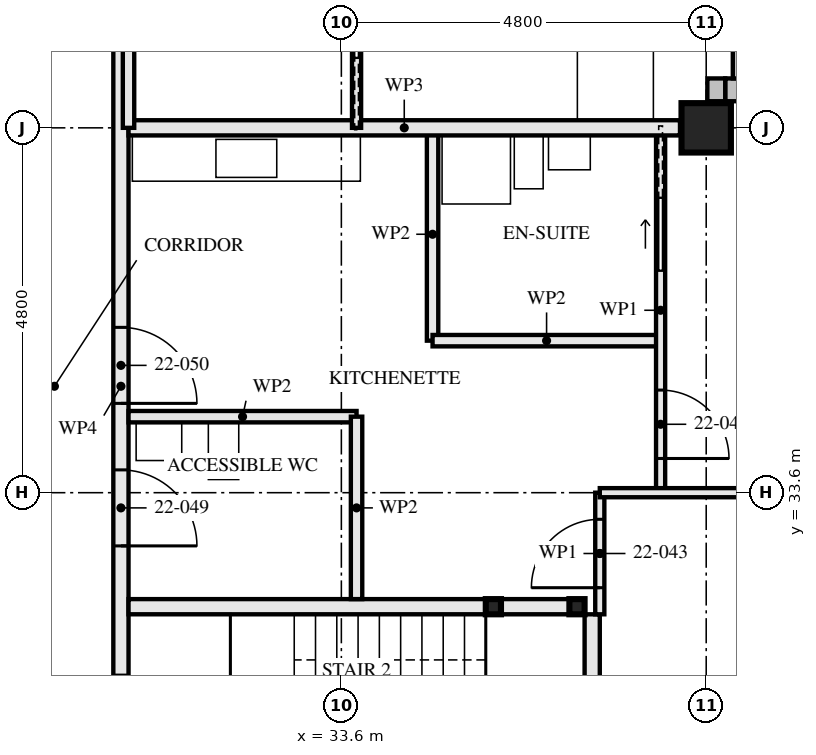
"""IFC4 building model, lengths in metres.
Left out: names, types, materials, properties, quantities, classifications, styles, units other than length and angle.
Written with IfcOpenShell. Run it as: python <this file> out.ifc"""

import sys

from ifc_helpers import new_model, si_unit, direction, frame, frame_2d, origin, origin_2d, place, context, subcontext, project, spatial, rectangle, hollow_rectangle, extrude, element, fill, save


model = new_model("IFC4")
c1 = context("Model", 3, precision=1e-05, world=origin(), true_north=direction((0.0, 1.0)))
c2 = subcontext(c1, "Body", "Model", "MODEL_VIEW")
j1 = project(units=[si_unit("LENGTHUNIT", "METRE"), si_unit("PLANEANGLEUNIT", "RADIAN")], contexts=[c1])
p1 = place(None, origin())
s1 = spatial("IfcSite", under=j1, at=p1, CompositionType="ELEMENT")
p2 = place(p1, origin())
s2 = spatial("IfcBuilding", under=s1, at=p2, CompositionType="ELEMENT")
p3 = place(p2, frame((0.0, 0.0, 84.0)))
s3 = spatial("IfcBuildingStorey", under=s2, at=p3, CompositionType="ELEMENT", Elevation=84.0)
p4 = place(p3, frame((38.4, 38.4, 0.0), z_axis=(0.0, 0.0, 1.0), x_axis=(0.0, 1.0, 0.0)))
e1 = element("IfcColumn", 1, at=p4, inside=s3, PredefinedType="COLUMN", context=c2, shape_type="SweptSolid", body=[
    extrude(hollow_rectangle(XDim=0.65, YDim=0.65, WallThickness=0.08, at=origin_2d()), origin(), (0.0, 0.0, 1.0), 3.5),
])
for number, where, z_axis, x_axis in (
    (2, (36.7, 32.1, 0.0), (0.0, 0.0, 1.0), (1.0, 0.0, 0.0)),
    (3, (35.6, 32.1, 0.0), (0.0, 0.0, 1.0), (1.0, 0.0, 0.0)),
):
    element("IfcColumn", number, at=place(p3, frame(where, z_axis=z_axis, x_axis=x_axis)), inside=s3, PredefinedType="COLUMN", context=c2, shape_type="SweptSolid", body=[
        extrude(hollow_rectangle(XDim=0.2, YDim=0.2, WallThickness=0.008, at=origin_2d()), origin(), (0.0, 0.0, 1.0), 3.33),
    ])
p5 = place(p3, frame((43.55, 38.9, 0.0), z_axis=(0.0, 0.0, 1.0), x_axis=(-1.0, 0.0, 0.0)))
e4 = element("IfcWall", 4, at=p5, inside=s3, PredefinedType="SOLIDWALL", context=c2, shape_type="SweptSolid", body=[
    extrude(rectangle(XDim=4.9, YDim=0.3, at=frame_2d((2.45, 0.0))), origin(), (0.0, 0.0, 1.0), 3.5),
])
p6 = place(p5, frame((2.25, 0.0, 0.0)))
e5 = element("IfcOpeningElement", 5, at=p6, cuts=e4, PredefinedType="OPENING", context=c2, shape_type="SweptSolid", body=[
    extrude(rectangle(XDim=1.0, YDim=2.4, at=frame_2d((0.5, 1.2))), frame((0.0, 0.161, 0.0), z_axis=(0.0, -1.0, 0.0), x_axis=(1.0, 0.0, 0.0)), (0.0, 0.0, 1.0), 0.321),
])
p7 = place(p3, frame((38.9, 39.05, 0.0), z_axis=(0.0, 0.0, 1.0), x_axis=(0.0, 1.0, 0.0)))
e6 = element("IfcWall", 6, at=p7, inside=s3, PredefinedType="SOLIDWALL", context=c2, shape_type="SweptSolid", body=[
    extrude(rectangle(XDim=4.8, YDim=0.3, at=frame_2d((2.4, 0.0))), origin(), (0.0, 0.0, 1.0), 3.5),
])
p8 = place(p7, frame((1.25, 0.0, 0.0)))
e7 = element("IfcOpeningElement", 7, at=p8, cuts=e6, PredefinedType="OPENING", context=c2, shape_type="SweptSolid", body=[
    extrude(rectangle(XDim=1.0, YDim=2.4, at=frame_2d((0.5, 1.2))), frame((0.0, 0.161, 0.0), z_axis=(0.0, -1.0, 0.0), x_axis=(1.0, 0.0, 0.0)), (0.0, 0.0, 1.0), 0.321),
])
p9 = place(p3, frame((38.65, 38.9, 2.39), z_axis=(0.0, 0.0, 1.0), x_axis=(-1.0, 0.0, 0.0)))
e8 = element("IfcWall", 8, at=p9, inside=s3, PredefinedType="SOLIDWALL", context=c2, shape_type="SweptSolid", body=[
    extrude(rectangle(XDim=0.235, YDim=0.3, at=frame_2d((0.117, 0.0))), origin(), (0.0, 0.0, 1.0), 0.88),
])
p10 = place(p3, frame((36.6, 32.1, 0.0), z_axis=(0.0, 0.0, 1.0), x_axis=(-1.0, 0.0, 0.0)))
e9 = element("IfcWall", 9, at=p10, inside=s3, PredefinedType="SOLIDWALL", context=c2, shape_type="SweptSolid", body=[
    extrude(rectangle(XDim=0.9, YDim=0.2, at=frame_2d((0.45, 0.0))), origin(), (0.0, 0.0, 1.0), 2.99),
])
p11 = place(p3, frame((35.5, 32.1, 0.0), z_axis=(0.0, 0.0, 1.0), x_axis=(-1.0, 0.0, 0.0)))
e10 = element("IfcWall", 10, at=p11, inside=s3, PredefinedType="SOLIDWALL", context=c2, shape_type="SweptSolid", body=[
    extrude(rectangle(XDim=4.7, YDim=0.2, at=frame_2d((2.35, 0.0))), origin(), (0.0, 0.0, 1.0), 2.99),
])
p12 = place(p3, frame((36.9, 29.4, 0.0), z_axis=(0.0, 0.0, 1.0), x_axis=(0.0, 1.0, 0.0)))
e11 = element("IfcWall", 11, at=p12, inside=s3, PredefinedType="SOLIDWALL", context=c2, shape_type="SweptSolid", body=[
    extrude(rectangle(XDim=2.6, YDim=0.2, at=frame_2d((1.3, 0.0))), origin(), (0.0, 0.0, 1.0), 3.33),
])
p13 = place(p3, frame((33.8, 32.2, 0.0), z_axis=(0.0, 0.0, 1.0), x_axis=(0.0, 1.0, 0.0)))
e12 = element("IfcWall", 12, at=p13, inside=s3, PredefinedType="PARTITIONING", context=c2, shape_type="SweptSolid", body=[
    extrude(rectangle(XDim=2.4, YDim=0.15, at=frame_2d((1.2, 0.0))), origin(), (0.0, 0.0, 1.0), 2.55),
])
for number, where, z_axis, x_axis in (
    (13, (33.8, 34.6, 0.0), (0.0, 0.0, 1.0), (-1.0, 0.0, 0.0)),
    (14, (37.8, 35.6, 0.0), (0.0, 0.0, 1.0), (-1.0, 0.0, 0.0)),
):
    element("IfcWall", number, at=place(p3, frame(where, z_axis=z_axis, x_axis=x_axis)), inside=s3, PredefinedType="PARTITIONING", context=c2, shape_type="SweptSolid", body=[
        extrude(rectangle(XDim=3.0, YDim=0.15, at=frame_2d((1.5, 0.0))), origin(), (0.0, 0.0, 1.0), 3.33),
    ])
p14 = place(p3, frame((34.8, 35.6, 0.0), z_axis=(0.0, 0.0, 1.0), x_axis=(0.0, 1.0, 0.0)))
e15 = element("IfcWall", 15, at=p14, inside=s3, PredefinedType="PARTITIONING", context=c2, shape_type="SweptSolid", body=[
    extrude(rectangle(XDim=2.8, YDim=0.15, at=frame_2d((1.4, 0.0))), origin(), (0.0, 0.0, 1.0), 3.33),
])
p15 = place(p3, frame((37.0, 32.0, 0.0), z_axis=(0.0, 0.0, 1.0), x_axis=(0.0, 1.0, 0.0)))
e16 = element("IfcWall", 16, at=p15, inside=s3, PredefinedType="PARTITIONING", context=c2, shape_type="SweptSolid", body=[
    extrude(rectangle(XDim=1.6, YDim=0.12, at=frame_2d((0.8, 0.0))), origin(), (0.0, 0.0, 1.0), 3.33),
])
p16 = place(p15, frame((0.35, 0.0, 0.0)))
e17 = element("IfcOpeningElement", 17, at=p16, cuts=e16, PredefinedType="OPENING", context=c2, shape_type="SweptSolid", body=[
    extrude(rectangle(XDim=0.9, YDim=2.1, at=frame_2d((0.45, 1.05))), frame((0.0, 0.071, 0.0), z_axis=(0.0, -1.0, 0.0), x_axis=(1.0, 0.0, 0.0)), (0.0, 0.0, 1.0), 0.141),
])
p17 = place(p3, frame((37.8, 33.6, 0.0), z_axis=(0.0, 0.0, 1.0), x_axis=(0.0, 1.0, 0.0)))
e18 = element("IfcWall", 18, at=p17, inside=s3, PredefinedType="PARTITIONING", context=c2, shape_type="SweptSolid", body=[
    extrude(rectangle(XDim=4.8, YDim=0.12, at=frame_2d((2.4, 0.0))), origin(), (0.0, 0.0, 1.0), 3.33),
])
p18 = place(p17, frame((0.45, 0.0, 0.0)))
e19 = element("IfcOpeningElement", 19, at=p18, cuts=e18, PredefinedType="OPENING", context=c2, shape_type="SweptSolid", body=[
    extrude(rectangle(XDim=0.9, YDim=2.1, at=frame_2d((0.45, 1.05))), frame((0.0, 0.071, 0.0), z_axis=(0.0, -1.0, 0.0), x_axis=(1.0, 0.0, 0.0)), (0.0, 0.0, 1.0), 0.141),
])
p19 = place(p17, frame((2.925, 0.0, 0.0)))
e20 = element("IfcOpeningElement", 20, at=p19, cuts=e18, PredefinedType="OPENING", context=c2, shape_type="SweptSolid", body=[
    extrude(rectangle(XDim=0.95, YDim=2.1, at=frame_2d((0.475, 1.05))), frame((0.0, 0.071, 0.0), z_axis=(0.0, -1.0, 0.0), x_axis=(1.0, 0.0, 0.0)), (0.0, 0.0, 1.0), 0.141),
])
p20 = place(p3, frame((42.855, 33.6, 0.0), z_axis=(0.0, 0.0, 1.0), x_axis=(-1.0, 0.0, 0.0)))
e21 = element("IfcWall", 21, at=p20, inside=s3, PredefinedType="PARTITIONING", context=c2, shape_type="SweptSolid", body=[
    extrude(rectangle(XDim=5.855, YDim=0.12, at=frame_2d((2.927, 0.0))), origin(), (0.0, 0.0, 1.0), 2.55),
])
p21 = place(p3, frame((38.055, 38.4, 0.0), z_axis=(0.0, 0.0, 1.0), x_axis=(-1.0, 0.0, 0.0)))
e22 = element("IfcWall", 22, at=p21, inside=s3, PredefinedType="PARTITIONING", context=c2, shape_type="SweptSolid", body=[
    extrude(rectangle(XDim=7.255, YDim=0.2, at=frame_2d((3.627, 0.0))), origin(), (0.0, 0.0, 1.0), 2.55),
])
p22 = place(p3, frame((30.8, 38.4, 0.0), z_axis=(0.0, 0.0, 1.0), x_axis=(0.0, 1.0, 0.0)))
e23 = element("IfcWall", 23, at=p22, inside=s3, PredefinedType="PARTITIONING", context=c2, shape_type="SweptSolid", body=[
    extrude(rectangle(XDim=2.8, YDim=0.15, at=frame_2d((1.4, 0.0))), origin(), (0.0, 0.0, 1.0), 3.33),
])
p23 = place(p3, frame((33.8, 38.4, 0.0), z_axis=(0.0, 0.0, 1.0), x_axis=(0.0, 1.0, 0.0)))
e24 = element("IfcWall", 24, at=p23, inside=s3, PredefinedType="PARTITIONING", context=c2, shape_type="SweptSolid", body=[
    extrude(rectangle(XDim=4.48, YDim=0.12, at=frame_2d((2.24, 0.0))), origin(), (0.0, 0.0, 1.0), 3.33),
])
p24 = place(p23, frame((2.975, 0.0, 0.0)))
e25 = element("IfcOpeningElement", 25, at=p24, cuts=e24, PredefinedType="OPENING", context=c2, shape_type="SweptSolid", body=[
    extrude(rectangle(XDim=0.9, YDim=2.1, at=frame_2d((0.45, 1.05))), frame((0.0, 0.071, 0.0), z_axis=(0.0, -1.0, 0.0), x_axis=(1.0, 0.0, 0.0)), (0.0, 0.0, 1.0), 0.141),
])
p25 = place(p23, frame((0.925, 0.0, 0.0)))
e26 = element("IfcOpeningElement", 26, at=p25, cuts=e24, PredefinedType="OPENING", context=c2, shape_type="SweptSolid", body=[
    extrude(rectangle(XDim=0.95, YDim=2.1, at=frame_2d((0.475, 1.05))), frame((0.0, 0.071, 0.0), z_axis=(0.0, -1.0, 0.0), x_axis=(1.0, 0.0, 0.0)), (0.0, 0.0, 1.0), 0.141),
])
p26 = place(p3, frame((30.7, 28.8, 0.0), z_axis=(0.0, 0.0, 1.0), x_axis=(0.0, 1.0, 0.0)))
e27 = element("IfcWall", 27, at=p26, inside=s3, PredefinedType="PARTITIONING", context=c2, shape_type="SweptSolid", body=[
    extrude(rectangle(XDim=12.4, YDim=0.2, at=frame_2d((6.2, 0.0))), origin(), (0.0, 0.0, 1.0), 2.55),
])
p27 = place(p26, frame((1.4, 0.0, 0.0)))
e28 = element("IfcOpeningElement", 28, at=p27, cuts=e27, PredefinedType="OPENING", context=c2, shape_type="SweptSolid", body=[
    extrude(rectangle(XDim=1.0, YDim=2.1, at=frame_2d((0.5, 1.05))), frame((0.0, 0.111, 0.0), z_axis=(0.0, -1.0, 0.0), x_axis=(1.0, 0.0, 0.0)), (0.0, 0.0, 1.0), 0.221),
])
p28 = place(p26, frame((4.1, 0.0, 0.0)))
e29 = element("IfcOpeningElement", 29, at=p28, cuts=e27, PredefinedType="OPENING", context=c2, shape_type="SweptSolid", body=[
    extrude(rectangle(XDim=1.0, YDim=2.1, at=frame_2d((0.5, 1.05))), frame((0.0, 0.111, 0.0), z_axis=(0.0, -1.0, 0.0), x_axis=(1.0, 0.0, 0.0)), (0.0, 0.0, 1.0), 0.221),
])
p29 = place(p26, frame((5.975, 0.0, 0.0)))
e30 = element("IfcOpeningElement", 30, at=p29, cuts=e27, PredefinedType="OPENING", context=c2, shape_type="SweptSolid", body=[
    extrude(rectangle(XDim=1.0, YDim=2.1, at=frame_2d((0.5, 1.05))), frame((0.0, 0.111, 0.0), z_axis=(0.0, -1.0, 0.0), x_axis=(1.0, 0.0, 0.0)), (0.0, 0.0, 1.0), 0.221),
])
p30 = place(p16, origin())
e31 = element("IfcDoor", 31, at=p30, inside=s3, OperationType="SINGLE_SWING_RIGHT", PredefinedType="DOOR", context=c2, shape_type="SweptSolid", body=[
    extrude(rectangle(XDim=0.9, YDim=2.1, at=frame_2d((0.45, 1.05))), frame((0.0, 0.022, 0.0), z_axis=(0.0, -1.0, 0.0), x_axis=(1.0, 0.0, 0.0)), (0.0, 0.0, 1.0), 0.044),
])
fill(e17, e31)
p31 = place(p18, frame((0.9, 0.0, 0.0), z_axis=(0.0, 0.0, 1.0), x_axis=(-1.0, 0.0, 0.0)))
e32 = element("IfcDoor", 32, at=p31, inside=s3, OperationType="SINGLE_SWING_LEFT", PredefinedType="DOOR", context=c2, shape_type="SweptSolid", body=[
    extrude(rectangle(XDim=0.9, YDim=2.1, at=frame_2d((0.45, 1.05))), frame((0.0, 0.022, 0.0), z_axis=(0.0, -1.0, 0.0), x_axis=(1.0, 0.0, 0.0)), (0.0, 0.0, 1.0), 0.044),
])
fill(e19, e32)
p32 = place(p19, origin())
e33 = element("IfcDoor", 33, at=p32, inside=s3, OperationType="SLIDING_TO_LEFT", PredefinedType="DOOR", context=c2, shape_type="SweptSolid", body=[
    extrude(rectangle(XDim=0.95, YDim=2.1, at=frame_2d((0.475, 1.05))), frame((0.0, 0.022, 0.0), z_axis=(0.0, -1.0, 0.0), x_axis=(1.0, 0.0, 0.0)), (0.0, 0.0, 1.0), 0.044),
])
fill(e20, e33)
p33 = place(p25, origin())
e34 = element("IfcDoor", 34, at=p33, inside=s3, OperationType="SLIDING_TO_RIGHT", PredefinedType="DOOR", context=c2, shape_type="SweptSolid", body=[
    extrude(rectangle(XDim=0.95, YDim=2.1, at=frame_2d((0.475, 1.05))), frame((0.0, 0.022, 0.0), z_axis=(0.0, -1.0, 0.0), x_axis=(1.0, 0.0, 0.0)), (0.0, 0.0, 1.0), 0.044),
])
fill(e26, e34)
p34 = place(p28, frame((1.0, 0.0, 0.0), z_axis=(0.0, 0.0, 1.0), x_axis=(-1.0, 0.0, 0.0)))
e35 = element("IfcDoor", 35, at=p34, inside=s3, OperationType="SINGLE_SWING_LEFT", PredefinedType="DOOR", context=c2, shape_type="SweptSolid", body=[
    extrude(rectangle(XDim=1.0, YDim=2.1, at=frame_2d((0.5, 1.05))), frame((0.0, 0.027, 0.0), z_axis=(0.0, -1.0, 0.0), x_axis=(1.0, 0.0, 0.0)), (0.0, 0.0, 1.0), 0.054),
])
fill(e29, e35)
p35 = place(p29, frame((1.0, 0.0, 0.0), z_axis=(0.0, 0.0, 1.0), x_axis=(-1.0, 0.0, 0.0)))
e36 = element("IfcDoor", 36, at=p35, inside=s3, OperationType="SINGLE_SWING_LEFT", PredefinedType="DOOR", context=c2, shape_type="SweptSolid", body=[
    extrude(rectangle(XDim=1.0, YDim=2.1, at=frame_2d((0.5, 1.05))), frame((0.0, 0.027, 0.0), z_axis=(0.0, -1.0, 0.0), x_axis=(1.0, 0.0, 0.0)), (0.0, 0.0, 1.0), 0.054),
])
fill(e30, e36)
save(model, sys.argv[1])
